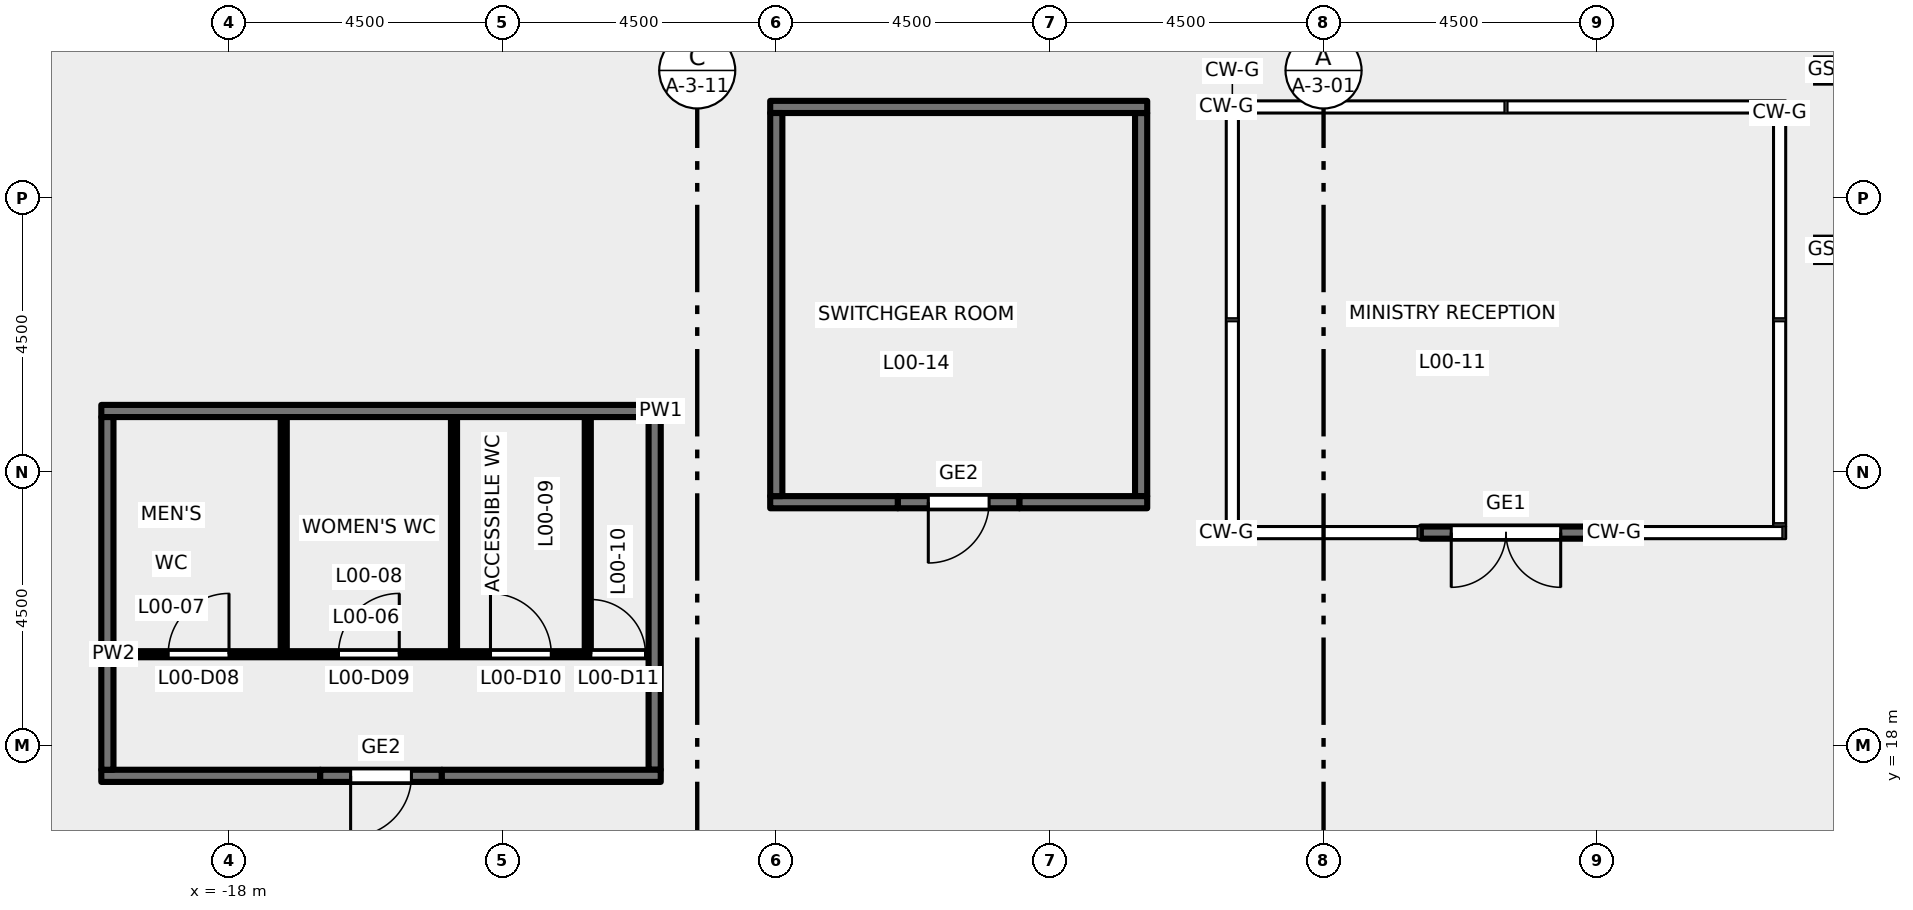
"""IFC4 building model, lengths in metres.
Left out: names, types, materials, properties, quantities, classifications, styles, units other than length and angle.
Written with IfcOpenShell. Run it as: python <this file> out.ifc"""

import sys

from ifc_helpers import new_model, si_unit, direction, frame, frame_2d, origin, origin_2d, place, context, subcontext, project, spatial, rectangle, extrude, element, fill, save


model = new_model("IFC4")
c1 = context("Model", 3, precision=1e-05, world=origin(), true_north=direction((0.0, 1.0)))
c2 = subcontext(c1, "Body", "Model", "MODEL_VIEW")
j1 = project(units=[si_unit("LENGTHUNIT", "METRE"), si_unit("PLANEANGLEUNIT", "RADIAN")], contexts=[c1])
p1 = place(None, origin())
s1 = spatial("IfcSite", under=j1, at=p1, CompositionType="ELEMENT")
p2 = place(p1, origin())
s2 = spatial("IfcBuilding", under=s1, at=p2, CompositionType="ELEMENT")
p3 = place(p2, origin())
s3 = spatial("IfcBuildingStorey", under=s2, at=p3, CompositionType="ELEMENT", Elevation=0.0)
p4 = place(p3, frame((-20.1, 17.5, 0.0), z_axis=(0.0, 0.0, 1.0), x_axis=(1.0, 0.0, 0.0)))
e1 = element("IfcWall", 1, at=p4, inside=s3, PredefinedType="SOLIDWALL", context=c2, shape_type="SweptSolid", body=[
    extrude(rectangle(XDim=3.6, YDim=0.2, at=frame_2d((1.8, 0.0))), origin(), (0.0, 0.0, 1.0), 4.3),
])
p5 = place(p3, frame((-16.5, 17.5, 0.0), z_axis=(0.0, 0.0, 1.0), x_axis=(1.0, 0.0, 0.0)))
e2 = element("IfcWall", 2, at=p5, inside=s3, PredefinedType="SOLIDWALL", context=c2, shape_type="SweptSolid", body=[
    extrude(rectangle(XDim=2.0, YDim=0.2, at=frame_2d((1.0, 0.0))), origin(), (0.0, 0.0, 1.0), 4.3),
])
p6 = place(p5, frame((0.5, 0.0, 0.0)))
e3 = element("IfcOpeningElement", 3, at=p6, cuts=e2, PredefinedType="OPENING", context=c2, shape_type="SweptSolid", body=[
    extrude(rectangle(XDim=1.0, YDim=2.1, at=frame_2d((0.5, 1.05))), frame((0.0, 0.11, 0.0), z_axis=(0.0, -1.0, 0.0), x_axis=(1.0, 0.0, 0.0)), (0.0, 0.0, 1.0), 0.22),
])
p7 = place(p3, frame((-14.5, 17.5, 0.0), z_axis=(0.0, 0.0, 1.0), x_axis=(1.0, 0.0, 0.0)))
e4 = element("IfcWall", 4, at=p7, inside=s3, PredefinedType="SOLIDWALL", context=c2, shape_type="SweptSolid", body=[
    extrude(rectangle(XDim=3.6, YDim=0.2, at=frame_2d((1.8, 0.0))), origin(), (0.0, 0.0, 1.0), 4.3),
])
p8 = place(p3, frame((-11.0, 17.6, 0.0), z_axis=(0.0, 0.0, 1.0), x_axis=(0.0, 1.0, 0.0)))
e5 = element("IfcWall", 5, at=p8, inside=s3, PredefinedType="SOLIDWALL", context=c2, shape_type="SweptSolid", body=[
    extrude(rectangle(XDim=5.8, YDim=0.2, at=frame_2d((2.9, 0.0))), origin(), (0.0, 0.0, 1.0), 4.3),
])
p9 = place(p3, frame((-20.1, 23.5, 0.0), z_axis=(0.0, 0.0, 1.0), x_axis=(1.0, 0.0, 0.0)))
e6 = element("IfcWall", 6, at=p9, inside=s3, PredefinedType="SOLIDWALL", context=c2, shape_type="SweptSolid", body=[
    extrude(rectangle(XDim=9.2, YDim=0.2, at=frame_2d((4.6, 0.0))), origin(), (0.0, 0.0, 1.0), 4.3),
])
p10 = place(p3, frame((-20.0, 17.6, 0.0), z_axis=(0.0, 0.0, 1.0), x_axis=(0.0, 1.0, 0.0)))
e7 = element("IfcWall", 7, at=p10, inside=s3, PredefinedType="SOLIDWALL", context=c2, shape_type="SweptSolid", body=[
    extrude(rectangle(XDim=5.8, YDim=0.2, at=frame_2d((2.9, 0.0))), origin(), (0.0, 0.0, 1.0), 4.3),
])
p11 = place(p3, frame((-19.9, 19.5, 0.0), z_axis=(0.0, 0.0, 1.0), x_axis=(1.0, 0.0, 0.0)))
e8 = element("IfcWall", 8, at=p11, inside=s3, PredefinedType="PARTITIONING", context=c2, shape_type="SweptSolid", body=[
    extrude(rectangle(XDim=8.8, YDim=0.1, at=frame_2d((4.4, 0.0))), origin(), (0.0, 0.0, 1.0), 4.3),
])
p12 = place(p11, frame((0.9, 0.0, 0.0)))
e9 = element("IfcOpeningElement", 9, at=p12, cuts=e8, PredefinedType="OPENING", context=c2, shape_type="SweptSolid", body=[
    extrude(rectangle(XDim=1.0, YDim=2.1, at=frame_2d((0.5, 1.05))), frame((0.0, 0.06, 0.0), z_axis=(0.0, -1.0, 0.0), x_axis=(1.0, 0.0, 0.0)), (0.0, 0.0, 1.0), 0.12),
])
p13 = place(p11, frame((3.7, 0.0, 0.0)))
e10 = element("IfcOpeningElement", 10, at=p13, cuts=e8, PredefinedType="OPENING", context=c2, shape_type="SweptSolid", body=[
    extrude(rectangle(XDim=1.0, YDim=2.1, at=frame_2d((0.5, 1.05))), frame((0.0, 0.06, 0.0), z_axis=(0.0, -1.0, 0.0), x_axis=(1.0, 0.0, 0.0)), (0.0, 0.0, 1.0), 0.12),
])
p14 = place(p11, frame((6.2, 0.0, 0.0)))
e11 = element("IfcOpeningElement", 11, at=p14, cuts=e8, PredefinedType="OPENING", context=c2, shape_type="SweptSolid", body=[
    extrude(rectangle(XDim=1.0, YDim=2.1, at=frame_2d((0.5, 1.05))), frame((0.0, 0.06, 0.0), z_axis=(0.0, -1.0, 0.0), x_axis=(1.0, 0.0, 0.0)), (0.0, 0.0, 1.0), 0.12),
])
p15 = place(p11, frame((7.85, 0.0, 0.0)))
e12 = element("IfcOpeningElement", 12, at=p15, cuts=e8, PredefinedType="OPENING", context=c2, shape_type="SweptSolid", body=[
    extrude(rectangle(XDim=0.9, YDim=2.1, at=frame_2d((0.45, 1.05))), frame((0.0, 0.06, 0.0), z_axis=(0.0, -1.0, 0.0), x_axis=(1.0, 0.0, 0.0)), (0.0, 0.0, 1.0), 0.12),
])
for number, where, z_axis, x_axis in (
    (13, (-17.1, 19.55, 0.0), (0.0, 0.0, 1.0), (0.0, 1.0, 0.0)),
    (14, (-14.3, 19.55, 0.0), (0.0, 0.0, 1.0), (0.0, 1.0, 0.0)),
    (15, (-12.1, 19.55, 0.0), (0.0, 0.0, 1.0), (0.0, 1.0, 0.0)),
):
    element("IfcWall", number, at=place(p3, frame(where, z_axis=z_axis, x_axis=x_axis)), inside=s3, PredefinedType="PARTITIONING", context=c2, shape_type="SweptSolid", body=[
        extrude(rectangle(XDim=3.85, YDim=0.1, at=frame_2d((1.925, 0.0))), origin(), (0.0, 0.0, 1.0), 4.3),
    ])
p16 = place(p3, frame((1.6, 21.5, 0.0), z_axis=(0.0, 0.0, 1.0), x_axis=(1.0, 0.0, 0.0)))
e16 = element("IfcWall", 16, at=p16, inside=s3, PredefinedType="SOLIDWALL", context=c2, shape_type="SweptSolid", body=[
    extrude(rectangle(XDim=2.8, YDim=0.2, at=frame_2d((1.4, 0.0))), origin(), (0.0, 0.0, 1.0), 4.3),
])
p17 = place(p16, frame((0.5, 0.0, 0.0)))
e17 = element("IfcOpeningElement", 17, at=p17, cuts=e16, PredefinedType="OPENING", context=c2, shape_type="SweptSolid", body=[
    extrude(rectangle(XDim=1.8, YDim=2.4, at=frame_2d((0.9, 1.2))), frame((0.0, 0.11, 0.0), z_axis=(0.0, -1.0, 0.0), x_axis=(1.0, 0.0, 0.0)), (0.0, 0.0, 1.0), 0.22),
])
p18 = place(p3, frame((-9.1, 22.0, 0.0), z_axis=(0.0, 0.0, 1.0), x_axis=(1.0, 0.0, 0.0)))
e18 = element("IfcWall", 18, at=p18, inside=s3, PredefinedType="SOLIDWALL", context=c2, shape_type="SweptSolid", body=[
    extrude(rectangle(XDim=2.1, YDim=0.2, at=frame_2d((1.05, 0.0))), origin(), (0.0, 0.0, 1.0), 4.3),
])
p19 = place(p3, frame((-7.0, 22.0, 0.0), z_axis=(0.0, 0.0, 1.0), x_axis=(1.0, 0.0, 0.0)))
e19 = element("IfcWall", 19, at=p19, inside=s3, PredefinedType="SOLIDWALL", context=c2, shape_type="SweptSolid", body=[
    extrude(rectangle(XDim=2.0, YDim=0.2, at=frame_2d((1.0, 0.0))), origin(), (0.0, 0.0, 1.0), 4.3),
])
p20 = place(p19, frame((0.5, 0.0, 0.0)))
e20 = element("IfcOpeningElement", 20, at=p20, cuts=e19, PredefinedType="OPENING", context=c2, shape_type="SweptSolid", body=[
    extrude(rectangle(XDim=1.0, YDim=2.1, at=frame_2d((0.5, 1.05))), frame((0.0, 0.11, 0.0), z_axis=(0.0, -1.0, 0.0), x_axis=(1.0, 0.0, 0.0)), (0.0, 0.0, 1.0), 0.22),
])
p21 = place(p3, frame((-5.0, 22.0, 0.0), z_axis=(0.0, 0.0, 1.0), x_axis=(1.0, 0.0, 0.0)))
e21 = element("IfcWall", 21, at=p21, inside=s3, PredefinedType="SOLIDWALL", context=c2, shape_type="SweptSolid", body=[
    extrude(rectangle(XDim=2.1, YDim=0.2, at=frame_2d((1.05, 0.0))), origin(), (0.0, 0.0, 1.0), 4.3),
])
p22 = place(p3, frame((-3.0, 22.1, 0.0), z_axis=(0.0, 0.0, 1.0), x_axis=(0.0, 1.0, 0.0)))
e22 = element("IfcWall", 22, at=p22, inside=s3, PredefinedType="SOLIDWALL", context=c2, shape_type="SweptSolid", body=[
    extrude(rectangle(XDim=6.3, YDim=0.2, at=frame_2d((3.15, 0.0))), origin(), (0.0, 0.0, 1.0), 4.3),
])
p23 = place(p3, frame((-9.1, 28.5, 0.0), z_axis=(0.0, 0.0, 1.0), x_axis=(1.0, 0.0, 0.0)))
e23 = element("IfcWall", 23, at=p23, inside=s3, PredefinedType="SOLIDWALL", context=c2, shape_type="SweptSolid", body=[
    extrude(rectangle(XDim=6.2, YDim=0.2, at=frame_2d((3.1, 0.0))), origin(), (0.0, 0.0, 1.0), 4.3),
])
p24 = place(p3, frame((-9.0, 22.1, 0.0), z_axis=(0.0, 0.0, 1.0), x_axis=(0.0, 1.0, 0.0)))
e24 = element("IfcWall", 24, at=p24, inside=s3, PredefinedType="SOLIDWALL", context=c2, shape_type="SweptSolid", body=[
    extrude(rectangle(XDim=6.3, YDim=0.2, at=frame_2d((3.15, 0.0))), origin(), (0.0, 0.0, 1.0), 4.3),
])
for number, where, z_axis, x_axis in (
    (25, (8.3, 29.1, 0.0), (0.0, 0.0, 1.0), (1.0, 0.0, 0.0)),
    (26, (8.3, 26.15, 0.0), (0.0, 0.0, 1.0), (1.0, 0.0, 0.0)),
):
    element("IfcColumn", number, at=place(p3, frame(where, z_axis=z_axis, x_axis=x_axis)), inside=s3, PredefinedType="COLUMN", context=c2, shape_type="SweptSolid", body=[
        extrude(rectangle(XDim=0.4, YDim=0.4, at=origin_2d()), origin(), (0.0, 0.0, 1.0), 7.2),
    ])
p25 = place(p6, frame((1.0, 0.0, 0.0), z_axis=(0.0, 0.0, 1.0), x_axis=(-1.0, 0.0, 0.0)))
e27 = element("IfcDoor", 27, at=p25, inside=s3, OperationType="SINGLE_SWING_LEFT", PredefinedType="DOOR", context=c2, shape_type="SweptSolid", body=[
    extrude(rectangle(XDim=1.0, YDim=2.1, at=frame_2d((0.5, 1.05))), frame((0.0, 0.025, 0.0), z_axis=(0.0, -1.0, 0.0), x_axis=(1.0, 0.0, 0.0)), (0.0, 0.0, 1.0), 0.05),
])
fill(e3, e27)
p26 = place(p12, origin())
e28 = element("IfcDoor", 28, at=p26, inside=s3, OperationType="SINGLE_SWING_RIGHT", PredefinedType="DOOR", context=c2, shape_type="SweptSolid", body=[
    extrude(rectangle(XDim=1.0, YDim=2.1, at=frame_2d((0.5, 1.05))), frame((0.0, 0.025, 0.0), z_axis=(0.0, -1.0, 0.0), x_axis=(1.0, 0.0, 0.0)), (0.0, 0.0, 1.0), 0.05),
])
fill(e9, e28)
p27 = place(p13, origin())
e29 = element("IfcDoor", 29, at=p27, inside=s3, OperationType="SINGLE_SWING_RIGHT", PredefinedType="DOOR", context=c2, shape_type="SweptSolid", body=[
    extrude(rectangle(XDim=1.0, YDim=2.1, at=frame_2d((0.5, 1.05))), frame((0.0, 0.025, 0.0), z_axis=(0.0, -1.0, 0.0), x_axis=(1.0, 0.0, 0.0)), (0.0, 0.0, 1.0), 0.05),
])
fill(e10, e29)
p28 = place(p14, origin())
e30 = element("IfcDoor", 30, at=p28, inside=s3, OperationType="SINGLE_SWING_LEFT", PredefinedType="DOOR", context=c2, shape_type="SweptSolid", body=[
    extrude(rectangle(XDim=1.0, YDim=2.1, at=frame_2d((0.5, 1.05))), frame((0.0, 0.025, 0.0), z_axis=(0.0, -1.0, 0.0), x_axis=(1.0, 0.0, 0.0)), (0.0, 0.0, 1.0), 0.05),
])
fill(e11, e30)
p29 = place(p15, origin())
e31 = element("IfcDoor", 31, at=p29, inside=s3, OperationType="SINGLE_SWING_LEFT", PredefinedType="DOOR", context=c2, shape_type="SweptSolid", body=[
    extrude(rectangle(XDim=0.9, YDim=2.1, at=frame_2d((0.45, 1.05))), frame((0.0, 0.025, 0.0), z_axis=(0.0, -1.0, 0.0), x_axis=(1.0, 0.0, 0.0)), (0.0, 0.0, 1.0), 0.05),
])
fill(e12, e31)
p30 = place(p17, frame((1.8, 0.0, 0.0), z_axis=(0.0, 0.0, 1.0), x_axis=(-1.0, 0.0, 0.0)))
e32 = element("IfcDoor", 32, at=p30, inside=s3, OperationType="DOUBLE_DOOR_SINGLE_SWING", PredefinedType="DOOR", context=c2, shape_type="SweptSolid", body=[
    extrude(rectangle(XDim=1.8, YDim=2.4, at=frame_2d((0.9, 1.2))), frame((0.0, 0.025, 0.0), z_axis=(0.0, -1.0, 0.0), x_axis=(1.0, 0.0, 0.0)), (0.0, 0.0, 1.0), 0.05),
])
fill(e17, e32)
p31 = place(p20, frame((1.0, 0.0, 0.0), z_axis=(0.0, 0.0, 1.0), x_axis=(-1.0, 0.0, 0.0)))
e33 = element("IfcDoor", 33, at=p31, inside=s3, OperationType="SINGLE_SWING_LEFT", PredefinedType="DOOR", context=c2, shape_type="SweptSolid", body=[
    extrude(rectangle(XDim=1.0, YDim=2.1, at=frame_2d((0.5, 1.05))), frame((0.0, 0.025, 0.0), z_axis=(0.0, -1.0, 0.0), x_axis=(1.0, 0.0, 0.0)), (0.0, 0.0, 1.0), 0.05),
])
fill(e20, e33)
save(model, sys.argv[1])
